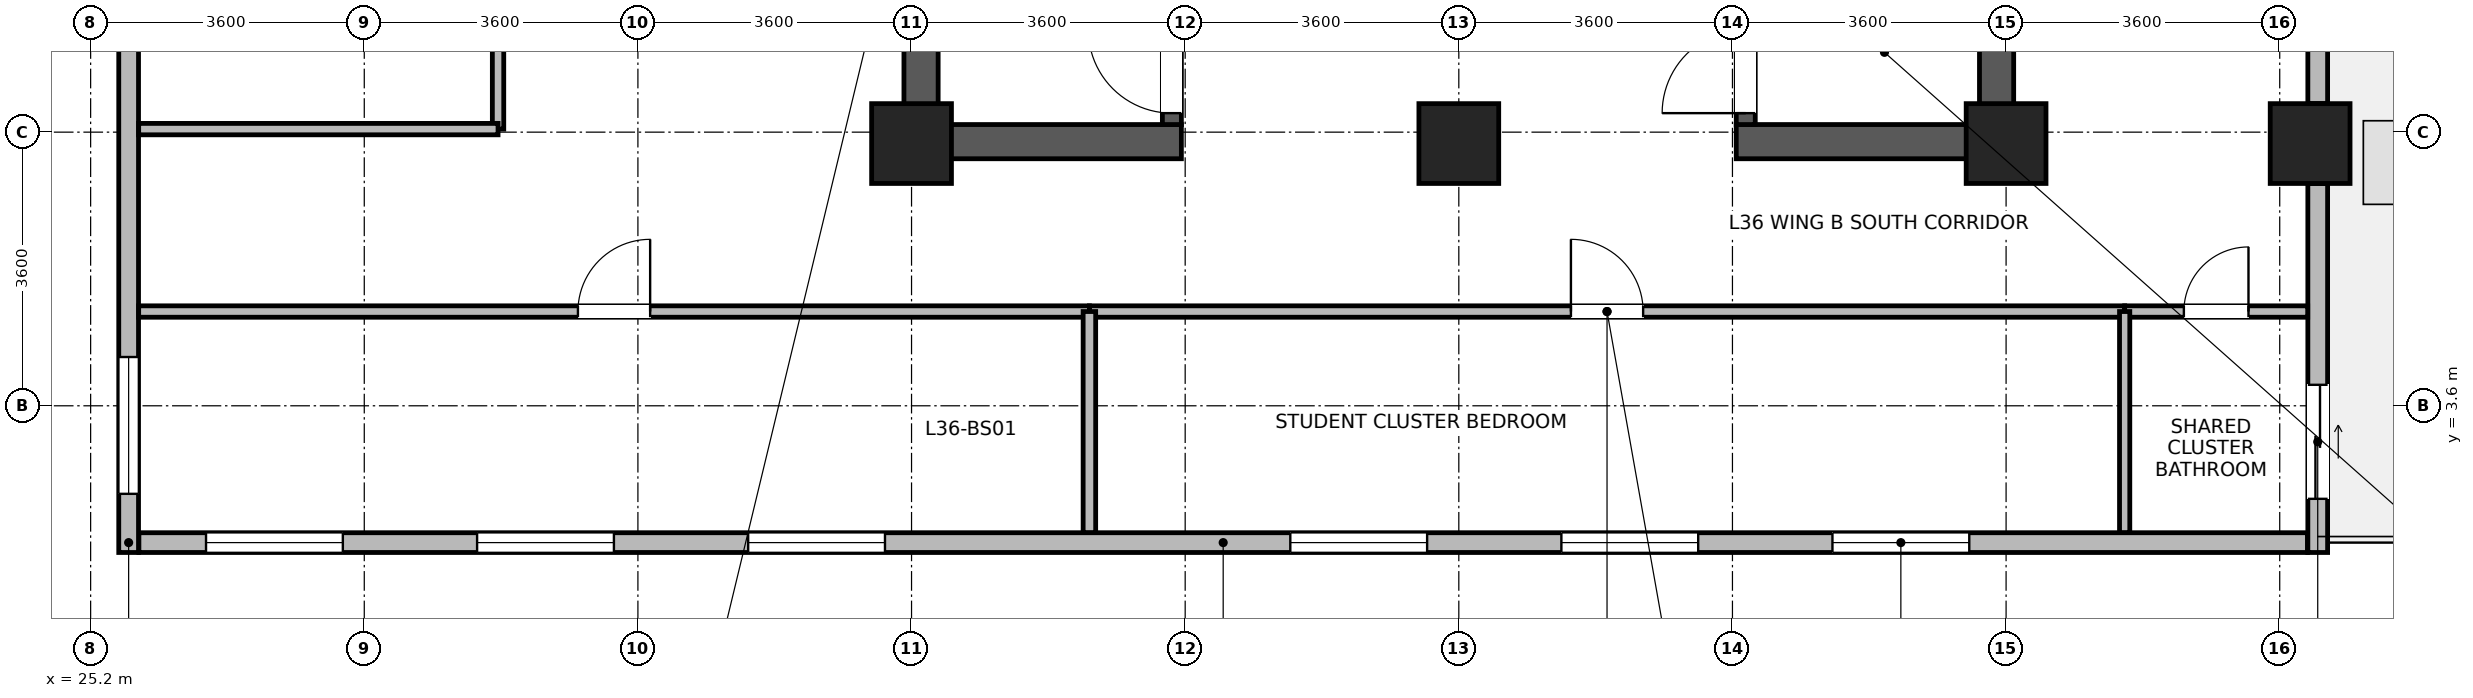
"""IFC4 building model, lengths in metres.
Left out: names, types, materials, properties, quantities, classifications, styles, units other than length and angle.
Written with IfcOpenShell. Run it as: python <this file> out.ifc"""

import sys

from ifc_helpers import new_model, si_unit, direction, frame, frame_2d, origin, origin_2d, place, context, subcontext, project, spatial, rectangle, extrude, source, transform, mapped, element, fill, save


model = new_model("IFC4")
c1 = context("Model", 3, precision=1e-05, world=origin(), true_north=direction((0.0, 1.0)))
c2 = subcontext(c1, "Body", "Model", "MODEL_VIEW")
j1 = project(units=[si_unit("LENGTHUNIT", "METRE"), si_unit("PLANEANGLEUNIT", "RADIAN")], contexts=[c1])
p1 = place(None, origin())
s1 = spatial("IfcSite", under=j1, at=p1, CompositionType="ELEMENT")
p2 = place(p1, origin())
s2 = spatial("IfcBuilding", under=s1, at=p2, CompositionType="ELEMENT")
p3 = place(p2, frame((0.0, 0.0, 143.9)))
s3 = spatial("IfcBuildingStorey", under=s2, at=p3, CompositionType="ELEMENT", Elevation=143.9)
for number, where, z_axis, x_axis in (
    (1, (36.125, 6.85, 0.0), (0.0, 0.0, 1.0), (0.0, 1.0, 0.0)),
    (2, (50.275, 6.85, 0.0), (0.0, 0.0, 1.0), (0.0, 1.0, 0.0)),
):
    element("IfcWall", number, at=place(p3, frame(where, z_axis=z_axis, x_axis=x_axis)), inside=s3, PredefinedType="SHEAR", context=c2, shape_type="SweptSolid", body=[
        extrude(rectangle(XDim=7.9, YDim=0.45, at=frame_2d((3.95, 0.0))), origin(), (0.0, 0.0, 1.0), 3.46),
    ])
for number, where, z_axis, x_axis in (
    (3, (36.35, 7.075, 0.0), (0.0, 0.0, 1.0), (1.0, 0.0, 0.0)),
    (4, (46.85, 7.075, 0.0), (0.0, 0.0, 1.0), (1.0, 0.0, 0.0)),
):
    element("IfcWall", number, at=place(p3, frame(where, z_axis=z_axis, x_axis=x_axis)), inside=s3, PredefinedType="SHEAR", context=c2, shape_type="SweptSolid", body=[
        extrude(rectangle(XDim=3.2, YDim=0.45, at=frame_2d((1.6, 0.0))), origin(), (0.0, 0.0, 1.0), 3.46),
    ])
p4 = place(p3, frame((39.425, 7.3, 0.0), z_axis=(0.0, 0.0, 1.0), x_axis=(0.0, 1.0, 0.0)))
e5 = element("IfcWall", 5, at=p4, inside=s3, PredefinedType="SHEAR", context=c2, shape_type="SweptSolid", body=[
    extrude(rectangle(XDim=7.0, YDim=0.25, at=frame_2d((3.5, 0.0))), origin(), (0.0, 0.0, 1.0), 3.46),
])
p5 = place(p4, frame((0.15, 0.0, 0.0)))
e6 = element("IfcOpeningElement", 6, at=p5, cuts=e5, PredefinedType="OPENING", context=c2, shape_type="SweptSolid", body=[
    extrude(rectangle(XDim=1.1, YDim=2.08, at=frame_2d((0.55, 1.04))), frame((0.0, 0.135, 0.0), z_axis=(0.0, -1.0, 0.0), x_axis=(1.0, 0.0, 0.0)), (0.0, 0.0, 1.0), 0.27),
])
p6 = place(p3, frame((46.975, 7.3, 0.0), z_axis=(0.0, 0.0, 1.0), x_axis=(0.0, 1.0, 0.0)))
e7 = element("IfcWall", 7, at=p6, inside=s3, PredefinedType="SHEAR", context=c2, shape_type="SweptSolid", body=[
    extrude(rectangle(XDim=7.0, YDim=0.25, at=frame_2d((3.5, 0.0))), origin(), (0.0, 0.0, 1.0), 3.46),
])
p7 = place(p6, frame((0.15, 0.0, 0.0)))
e8 = element("IfcOpeningElement", 8, at=p7, cuts=e7, PredefinedType="OPENING", context=c2, shape_type="SweptSolid", body=[
    extrude(rectangle(XDim=1.1, YDim=2.08, at=frame_2d((0.55, 1.04))), frame((0.0, 0.135, 0.0), z_axis=(0.0, -1.0, 0.0), x_axis=(1.0, 0.0, 0.0)), (0.0, 0.0, 1.0), 0.27),
])
m1 = source(origin(), c2, "Body", "SweptSolid", [
    extrude(rectangle(XDim=1.05, YDim=1.05, at=origin_2d()), origin(), (0.0, 0.0, 1.0), 3.7),
])
for number, where, z_axis, x_axis in (
    (9, (36.0, 7.05, 0.0), (0.0, 0.0, 1.0), (1.0, 0.0, 0.0)),
    (10, (43.2, 7.05, 0.0), (0.0, 0.0, 1.0), (1.0, 0.0, 0.0)),
    (11, (50.4, 7.05, 0.0), (0.0, 0.0, 1.0), (1.0, 0.0, 0.0)),
    (12, (54.4, 7.05, 0.0), (0.0, 0.0, 1.0), (1.0, 0.0, 0.0)),
):
    element("IfcColumn", number, at=place(p3, frame(where, z_axis=z_axis, x_axis=x_axis)), inside=s3, PredefinedType="COLUMN", context=c2, shape_type="MappedRepresentation", body=[
        mapped(m1, transform((0.0, 0.0, 0.0), x_axis=(1.0, 0.0, 0.0), y_axis=(0.0, 1.0, 0.0), z_axis=(0.0, 0.0, 1.0), scale=1.0)),
    ])
p8 = place(p3, frame((54.365, 1.8, 0.0), z_axis=(0.0, 0.0, 1.0), x_axis=(-1.0, 0.0, 0.0)))
e13 = element("IfcWall", 13, at=p8, inside=s3, PredefinedType="STANDARD", context=c2, shape_type="SweptSolid", body=[
    extrude(rectangle(XDim=28.53, YDim=0.26, at=frame_2d((14.265, 0.0))), origin(), (0.0, 0.0, 1.0), 3.44),
])
p9 = place(p8, frame((4.449, 0.0, 0.85)))
e14 = element("IfcOpeningElement", 14, at=p9, cuts=e13, PredefinedType="OPENING", context=c2, shape_type="SweptSolid", body=[
    extrude(rectangle(XDim=1.8, YDim=1.85, at=frame_2d((0.9, 0.925))), frame((0.0, 0.14, 0.0), z_axis=(0.0, -1.0, 0.0), x_axis=(1.0, 0.0, 0.0)), (0.0, 0.0, 1.0), 0.28),
])
p10 = place(p8, frame((8.016, 0.0, 0.85)))
e15 = element("IfcOpeningElement", 15, at=p10, cuts=e13, PredefinedType="OPENING", context=c2, shape_type="SweptSolid", body=[
    extrude(rectangle(XDim=1.8, YDim=1.85, at=frame_2d((0.9, 0.925))), frame((0.0, 0.14, 0.0), z_axis=(0.0, -1.0, 0.0), x_axis=(1.0, 0.0, 0.0)), (0.0, 0.0, 1.0), 0.28),
])
p11 = place(p8, frame((11.582, 0.0, 0.85)))
e16 = element("IfcOpeningElement", 16, at=p11, cuts=e13, PredefinedType="OPENING", context=c2, shape_type="SweptSolid", body=[
    extrude(rectangle(XDim=1.8, YDim=1.85, at=frame_2d((0.9, 0.925))), frame((0.0, 0.14, 0.0), z_axis=(0.0, -1.0, 0.0), x_axis=(1.0, 0.0, 0.0)), (0.0, 0.0, 1.0), 0.28),
])
p12 = place(p8, frame((18.714, 0.0, 0.85)))
e17 = element("IfcOpeningElement", 17, at=p12, cuts=e13, PredefinedType="OPENING", context=c2, shape_type="SweptSolid", body=[
    extrude(rectangle(XDim=1.8, YDim=1.85, at=frame_2d((0.9, 0.925))), frame((0.0, 0.14, 0.0), z_axis=(0.0, -1.0, 0.0), x_axis=(1.0, 0.0, 0.0)), (0.0, 0.0, 1.0), 0.28),
])
p13 = place(p8, frame((22.281, 0.0, 0.85)))
e18 = element("IfcOpeningElement", 18, at=p13, cuts=e13, PredefinedType="OPENING", context=c2, shape_type="SweptSolid", body=[
    extrude(rectangle(XDim=1.8, YDim=1.85, at=frame_2d((0.9, 0.925))), frame((0.0, 0.14, 0.0), z_axis=(0.0, -1.0, 0.0), x_axis=(1.0, 0.0, 0.0)), (0.0, 0.0, 1.0), 0.28),
])
p14 = place(p8, frame((25.847, 0.0, 0.85)))
e19 = element("IfcOpeningElement", 19, at=p14, cuts=e13, PredefinedType="OPENING", context=c2, shape_type="SweptSolid", body=[
    extrude(rectangle(XDim=1.8, YDim=1.85, at=frame_2d((0.9, 0.925))), frame((0.0, 0.14, 0.0), z_axis=(0.0, -1.0, 0.0), x_axis=(1.0, 0.0, 0.0)), (0.0, 0.0, 1.0), 0.28),
])
p15 = place(p3, frame((54.5, 6.524, 0.0), z_axis=(0.0, 0.0, 1.0), x_axis=(0.0, -1.0, 0.0)))
e20 = element("IfcWall", 20, at=p15, inside=s3, PredefinedType="STANDARD", context=c2, shape_type="SweptSolid", body=[
    extrude(rectangle(XDim=4.854, YDim=0.26, at=frame_2d((2.427, 0.0))), origin(), (0.0, 0.0, 1.0), 3.44),
])
p16 = place(p15, frame((2.648, 0.0, 0.0)))
e21 = element("IfcOpeningElement", 21, at=p16, cuts=e20, PredefinedType="OPENING", context=c2, shape_type="SweptSolid", body=[
    extrude(rectangle(XDim=1.5, YDim=2.15, at=frame_2d((0.75, 1.075))), frame((0.0, 0.14, 0.0), z_axis=(0.0, -1.0, 0.0), x_axis=(1.0, 0.0, 0.0)), (0.0, 0.0, 1.0), 0.28),
])
p17 = place(p3, frame((54.5, 14.024, 0.0), z_axis=(0.0, 0.0, 1.0), x_axis=(0.0, -1.0, 0.0)))
e22 = element("IfcWall", 22, at=p17, inside=s3, PredefinedType="STANDARD", context=c2, shape_type="SweptSolid", body=[
    extrude(rectangle(XDim=6.448, YDim=0.26, at=frame_2d((3.224, 0.0))), origin(), (0.0, 0.0, 1.0), 2.99),
])
p18 = place(p17, frame((3.936, 0.0, 0.85)))
e23 = element("IfcOpeningElement", 23, at=p18, cuts=e22, PredefinedType="OPENING", context=c2, shape_type="SweptSolid", body=[
    extrude(rectangle(XDim=1.8, YDim=1.85, at=frame_2d((0.9, 0.925))), frame((0.0, 0.14, 0.0), z_axis=(0.0, -1.0, 0.0), x_axis=(1.0, 0.0, 0.0)), (0.0, 0.0, 1.0), 0.28),
])
p19 = place(p17, frame((1.15, 0.0, 0.85)))
e24 = element("IfcOpeningElement", 24, at=p19, cuts=e22, PredefinedType="OPENING", context=c2, shape_type="SweptSolid", body=[
    extrude(rectangle(XDim=0.95, YDim=1.75, at=frame_2d((0.475, 0.875))), frame((0.0, 0.14, 0.0), z_axis=(0.0, -1.0, 0.0), x_axis=(1.0, 0.0, 0.0)), (0.0, 0.0, 1.0), 0.28),
])
p20 = place(p3, frame((25.7, 1.67, 0.0), z_axis=(0.0, 0.0, 1.0), x_axis=(0.0, 1.0, 0.0)))
e25 = element("IfcWall", 25, at=p20, inside=s3, PredefinedType="STANDARD", context=c2, shape_type="SweptSolid", body=[
    extrude(rectangle(XDim=20.06, YDim=0.26, at=frame_2d((10.03, 0.0))), origin(), (0.0, 0.0, 1.0), 3.44),
])
p21 = place(p20, frame((0.772, 0.0, 0.85)))
e26 = element("IfcOpeningElement", 26, at=p21, cuts=e25, PredefinedType="OPENING", context=c2, shape_type="SweptSolid", body=[
    extrude(rectangle(XDim=1.8, YDim=1.85, at=frame_2d((0.9, 0.925))), frame((0.0, 0.14, 0.0), z_axis=(0.0, -1.0, 0.0), x_axis=(1.0, 0.0, 0.0)), (0.0, 0.0, 1.0), 0.28),
])
p22 = place(p20, frame((7.458, 0.0, 0.85)))
e27 = element("IfcOpeningElement", 27, at=p22, cuts=e25, PredefinedType="OPENING", context=c2, shape_type="SweptSolid", body=[
    extrude(rectangle(XDim=1.8, YDim=1.85, at=frame_2d((0.9, 0.925))), frame((0.0, 0.14, 0.0), z_axis=(0.0, -1.0, 0.0), x_axis=(1.0, 0.0, 0.0)), (0.0, 0.0, 1.0), 0.28),
])
p23 = place(p20, frame((14.145, 0.0, 0.85)))
e28 = element("IfcOpeningElement", 28, at=p23, cuts=e25, PredefinedType="OPENING", context=c2, shape_type="SweptSolid", body=[
    extrude(rectangle(XDim=1.8, YDim=1.85, at=frame_2d((0.9, 0.925))), frame((0.0, 0.14, 0.0), z_axis=(0.0, -1.0, 0.0), x_axis=(1.0, 0.0, 0.0)), (0.0, 0.0, 1.0), 0.28),
])
p24 = place(p20, frame((17.488, 0.0, 0.85)))
e29 = element("IfcOpeningElement", 29, at=p24, cuts=e25, PredefinedType="OPENING", context=c2, shape_type="SweptSolid", body=[
    extrude(rectangle(XDim=1.8, YDim=1.85, at=frame_2d((0.9, 0.925))), frame((0.0, 0.14, 0.0), z_axis=(0.0, -1.0, 0.0), x_axis=(1.0, 0.0, 0.0)), (0.0, 0.0, 1.0), 0.28),
])
p25 = place(p3, frame((38.34, 4.84, 0.0), z_axis=(0.0, 0.0, 1.0), x_axis=(1.0, 0.0, 0.0)))
e30 = element("IfcWall", 30, at=p25, inside=s3, PredefinedType="PARTITIONING", context=c2, shape_type="SweptSolid", body=[
    extrude(rectangle(XDim=13.62, YDim=0.15, at=frame_2d((6.81, 0.0))), origin(), (0.0, 0.0, 1.0), 3.44),
])
p26 = place(p25, frame((6.335, 0.0, 0.0)))
e31 = element("IfcOpeningElement", 31, at=p26, cuts=e30, PredefinedType="OPENING", context=c2, shape_type="SweptSolid", body=[
    extrude(rectangle(XDim=0.95, YDim=2.1, at=frame_2d((0.475, 1.05))), frame((0.0, 0.085, 0.0), z_axis=(0.0, -1.0, 0.0), x_axis=(1.0, 0.0, 0.0)), (0.0, 0.0, 1.0), 0.17),
])
p27 = place(p3, frame((25.832, 4.84, 0.0), z_axis=(0.0, 0.0, 1.0), x_axis=(1.0, 0.0, 0.0)))
e32 = element("IfcWall", 32, at=p27, inside=s3, PredefinedType="PARTITIONING", context=c2, shape_type="SweptSolid", body=[
    extrude(rectangle(XDim=12.508, YDim=0.15, at=frame_2d((6.254, 0.0))), origin(), (0.0, 0.0, 1.0), 3.44),
])
p28 = place(p27, frame((5.779, 0.0, 0.0)))
e33 = element("IfcOpeningElement", 33, at=p28, cuts=e32, PredefinedType="OPENING", context=c2, shape_type="SweptSolid", body=[
    extrude(rectangle(XDim=0.95, YDim=2.1, at=frame_2d((0.475, 1.05))), frame((0.0, 0.085, 0.0), z_axis=(0.0, -1.0, 0.0), x_axis=(1.0, 0.0, 0.0)), (0.0, 0.0, 1.0), 0.17),
])
p29 = place(p3, frame((30.56, 7.24, 0.0), z_axis=(0.0, 0.0, 1.0), x_axis=(0.0, 1.0, 0.0)))
e34 = element("IfcWall", 34, at=p29, inside=s3, PredefinedType="PARTITIONING", context=c2, shape_type="SweptSolid", body=[
    extrude(rectangle(XDim=7.26, YDim=0.15, at=frame_2d((3.63, 0.0))), origin(), (0.0, 0.0, 1.0), 3.44),
])
p30 = place(p29, frame((2.98, 0.0, 0.0)))
e35 = element("IfcOpeningElement", 35, at=p30, cuts=e34, PredefinedType="OPENING", context=c2, shape_type="SweptSolid", body=[
    extrude(rectangle(XDim=1.3, YDim=2.12, at=frame_2d((0.65, 1.06))), frame((0.0, 0.085, 0.0), z_axis=(0.0, -1.0, 0.0), x_axis=(1.0, 0.0, 0.0)), (0.0, 0.0, 1.0), 0.17),
])
p31 = place(p3, frame((25.832, 7.24, 0.0), z_axis=(0.0, 0.0, 1.0), x_axis=(1.0, 0.0, 0.0)))
e36 = element("IfcWall", 36, at=p31, inside=s3, PredefinedType="PARTITIONING", context=c2, shape_type="SweptSolid", body=[
    extrude(rectangle(XDim=4.728, YDim=0.15, at=frame_2d((2.364, 0.0))), origin(), (0.0, 0.0, 1.0), 3.44),
])
p32 = place(p3, frame((51.96, 4.84, 0.0), z_axis=(0.0, 0.0, 1.0), x_axis=(1.0, 0.0, 0.0)))
e37 = element("IfcWall", 37, at=p32, inside=s3, PredefinedType="PARTITIONING", context=c2, shape_type="SweptSolid", body=[
    extrude(rectangle(XDim=2.408, YDim=0.15, at=frame_2d((1.204, 0.0))), origin(), (0.0, 0.0, 1.0), 3.44),
])
p33 = place(p32, frame((0.779, 0.0, 0.0)))
e38 = element("IfcOpeningElement", 38, at=p33, cuts=e37, PredefinedType="OPENING", context=c2, shape_type="SweptSolid", body=[
    extrude(rectangle(XDim=0.85, YDim=2.04, at=frame_2d((0.425, 1.02))), frame((0.0, 0.085, 0.0), z_axis=(0.0, -1.0, 0.0), x_axis=(1.0, 0.0, 0.0)), (0.0, 0.0, 1.0), 0.17),
])
p34 = place(p3, frame((38.34, 1.932, 0.0), z_axis=(0.0, 0.0, 1.0), x_axis=(0.0, 1.0, 0.0)))
e39 = element("IfcWall", 39, at=p34, inside=s3, PredefinedType="PARTITIONING", context=c2, shape_type="SweptSolid", body=[
    extrude(rectangle(XDim=2.908, YDim=0.165, at=frame_2d((1.454, 0.0))), origin(), (0.0, 0.0, 1.0), 3.44),
])
p35 = place(p3, frame((51.96, 1.932, 0.0), z_axis=(0.0, 0.0, 1.0), x_axis=(0.0, 1.0, 0.0)))
e40 = element("IfcWall", 40, at=p35, inside=s3, PredefinedType="PARTITIONING", context=c2, shape_type="SweptSolid", body=[
    extrude(rectangle(XDim=2.908, YDim=0.135, at=frame_2d((1.454, 0.0))), origin(), (0.0, 0.0, 1.0), 3.44),
])
p36 = place(p9, origin())
e41 = element("IfcWindow", 41, at=p36, inside=s3, PartitioningType="SINGLE_PANEL", PredefinedType="WINDOW", context=c2, shape_type="SweptSolid", body=[
    extrude(rectangle(XDim=1.8, YDim=1.85, at=frame_2d((0.9, 0.925))), frame((0.0, 0.03, 0.0), z_axis=(0.0, -1.0, 0.0), x_axis=(1.0, 0.0, 0.0)), (0.0, 0.0, 1.0), 0.06),
])
fill(e14, e41)
p37 = place(p10, origin())
e42 = element("IfcWindow", 42, at=p37, inside=s3, PartitioningType="SINGLE_PANEL", PredefinedType="WINDOW", context=c2, shape_type="SweptSolid", body=[
    extrude(rectangle(XDim=1.8, YDim=1.85, at=frame_2d((0.9, 0.925))), frame((0.0, 0.03, 0.0), z_axis=(0.0, -1.0, 0.0), x_axis=(1.0, 0.0, 0.0)), (0.0, 0.0, 1.0), 0.06),
])
fill(e15, e42)
p38 = place(p11, origin())
e43 = element("IfcWindow", 43, at=p38, inside=s3, PartitioningType="SINGLE_PANEL", PredefinedType="WINDOW", context=c2, shape_type="SweptSolid", body=[
    extrude(rectangle(XDim=1.8, YDim=1.85, at=frame_2d((0.9, 0.925))), frame((0.0, 0.03, 0.0), z_axis=(0.0, -1.0, 0.0), x_axis=(1.0, 0.0, 0.0)), (0.0, 0.0, 1.0), 0.06),
])
fill(e16, e43)
p39 = place(p12, origin())
e44 = element("IfcWindow", 44, at=p39, inside=s3, PartitioningType="SINGLE_PANEL", PredefinedType="WINDOW", context=c2, shape_type="SweptSolid", body=[
    extrude(rectangle(XDim=1.8, YDim=1.85, at=frame_2d((0.9, 0.925))), frame((0.0, 0.03, 0.0), z_axis=(0.0, -1.0, 0.0), x_axis=(1.0, 0.0, 0.0)), (0.0, 0.0, 1.0), 0.06),
])
fill(e17, e44)
p40 = place(p13, origin())
e45 = element("IfcWindow", 45, at=p40, inside=s3, PartitioningType="SINGLE_PANEL", PredefinedType="WINDOW", context=c2, shape_type="SweptSolid", body=[
    extrude(rectangle(XDim=1.8, YDim=1.85, at=frame_2d((0.9, 0.925))), frame((0.0, 0.03, 0.0), z_axis=(0.0, -1.0, 0.0), x_axis=(1.0, 0.0, 0.0)), (0.0, 0.0, 1.0), 0.06),
])
fill(e18, e45)
p41 = place(p14, origin())
e46 = element("IfcWindow", 46, at=p41, inside=s3, PartitioningType="SINGLE_PANEL", PredefinedType="WINDOW", context=c2, shape_type="SweptSolid", body=[
    extrude(rectangle(XDim=1.8, YDim=1.85, at=frame_2d((0.9, 0.925))), frame((0.0, 0.03, 0.0), z_axis=(0.0, -1.0, 0.0), x_axis=(1.0, 0.0, 0.0)), (0.0, 0.0, 1.0), 0.06),
])
fill(e19, e46)
p42 = place(p16, origin())
e47 = element("IfcDoor", 47, at=p42, inside=s3, OperationType="SLIDING_TO_LEFT", PredefinedType="DOOR", context=c2, shape_type="SweptSolid", body=[
    extrude(rectangle(XDim=1.5, YDim=2.15, at=frame_2d((0.75, 1.075))), frame((0.0, 0.025, 0.0), z_axis=(0.0, -1.0, 0.0), x_axis=(1.0, 0.0, 0.0)), (0.0, 0.0, 1.0), 0.05),
])
fill(e21, e47)
p43 = place(p21, origin())
e48 = element("IfcWindow", 48, at=p43, inside=s3, PartitioningType="SINGLE_PANEL", PredefinedType="WINDOW", context=c2, shape_type="SweptSolid", body=[
    extrude(rectangle(XDim=1.8, YDim=1.85, at=frame_2d((0.9, 0.925))), frame((0.0, 0.03, 0.0), z_axis=(0.0, -1.0, 0.0), x_axis=(1.0, 0.0, 0.0)), (0.0, 0.0, 1.0), 0.06),
])
fill(e26, e48)
p44 = place(p5, origin())
e49 = element("IfcDoor", 49, at=p44, inside=s3, OperationType="SINGLE_SWING_RIGHT", PredefinedType="DOOR", context=c2, shape_type="SweptSolid", body=[
    extrude(rectangle(XDim=1.1, YDim=2.08, at=frame_2d((0.55, 1.04))), frame((0.0, 0.025, 0.0), z_axis=(0.0, -1.0, 0.0), x_axis=(1.0, 0.0, 0.0)), (0.0, 0.0, 1.0), 0.05),
])
fill(e6, e49)
p45 = place(p7, origin())
e50 = element("IfcDoor", 50, at=p45, inside=s3, OperationType="SINGLE_SWING_LEFT", PredefinedType="DOOR", context=c2, shape_type="SweptSolid", body=[
    extrude(rectangle(XDim=1.1, YDim=2.08, at=frame_2d((0.55, 1.04))), frame((0.0, 0.025, 0.0), z_axis=(0.0, -1.0, 0.0), x_axis=(1.0, 0.0, 0.0)), (0.0, 0.0, 1.0), 0.05),
])
fill(e8, e50)
p46 = place(p26, origin())
e51 = element("IfcDoor", 51, at=p46, inside=s3, OperationType="SINGLE_SWING_LEFT", PredefinedType="DOOR", context=c2, shape_type="SweptSolid", body=[
    extrude(rectangle(XDim=0.95, YDim=2.1, at=frame_2d((0.475, 1.05))), frame((0.0, 0.025, 0.0), z_axis=(0.0, -1.0, 0.0), x_axis=(1.0, 0.0, 0.0)), (0.0, 0.0, 1.0), 0.05),
])
fill(e31, e51)
p47 = place(p28, origin())
e52 = element("IfcDoor", 52, at=p47, inside=s3, OperationType="SINGLE_SWING_RIGHT", PredefinedType="DOOR", context=c2, shape_type="SweptSolid", body=[
    extrude(rectangle(XDim=0.95, YDim=2.1, at=frame_2d((0.475, 1.05))), frame((0.0, 0.025, 0.0), z_axis=(0.0, -1.0, 0.0), x_axis=(1.0, 0.0, 0.0)), (0.0, 0.0, 1.0), 0.05),
])
fill(e33, e52)
p48 = place(p33, origin())
e53 = element("IfcDoor", 53, at=p48, inside=s3, OperationType="SINGLE_SWING_RIGHT", PredefinedType="DOOR", context=c2, shape_type="SweptSolid", body=[
    extrude(rectangle(XDim=0.85, YDim=2.04, at=frame_2d((0.425, 1.02))), frame((0.0, 0.025, 0.0), z_axis=(0.0, -1.0, 0.0), x_axis=(1.0, 0.0, 0.0)), (0.0, 0.0, 1.0), 0.05),
])
fill(e38, e53)
save(model, sys.argv[1])
